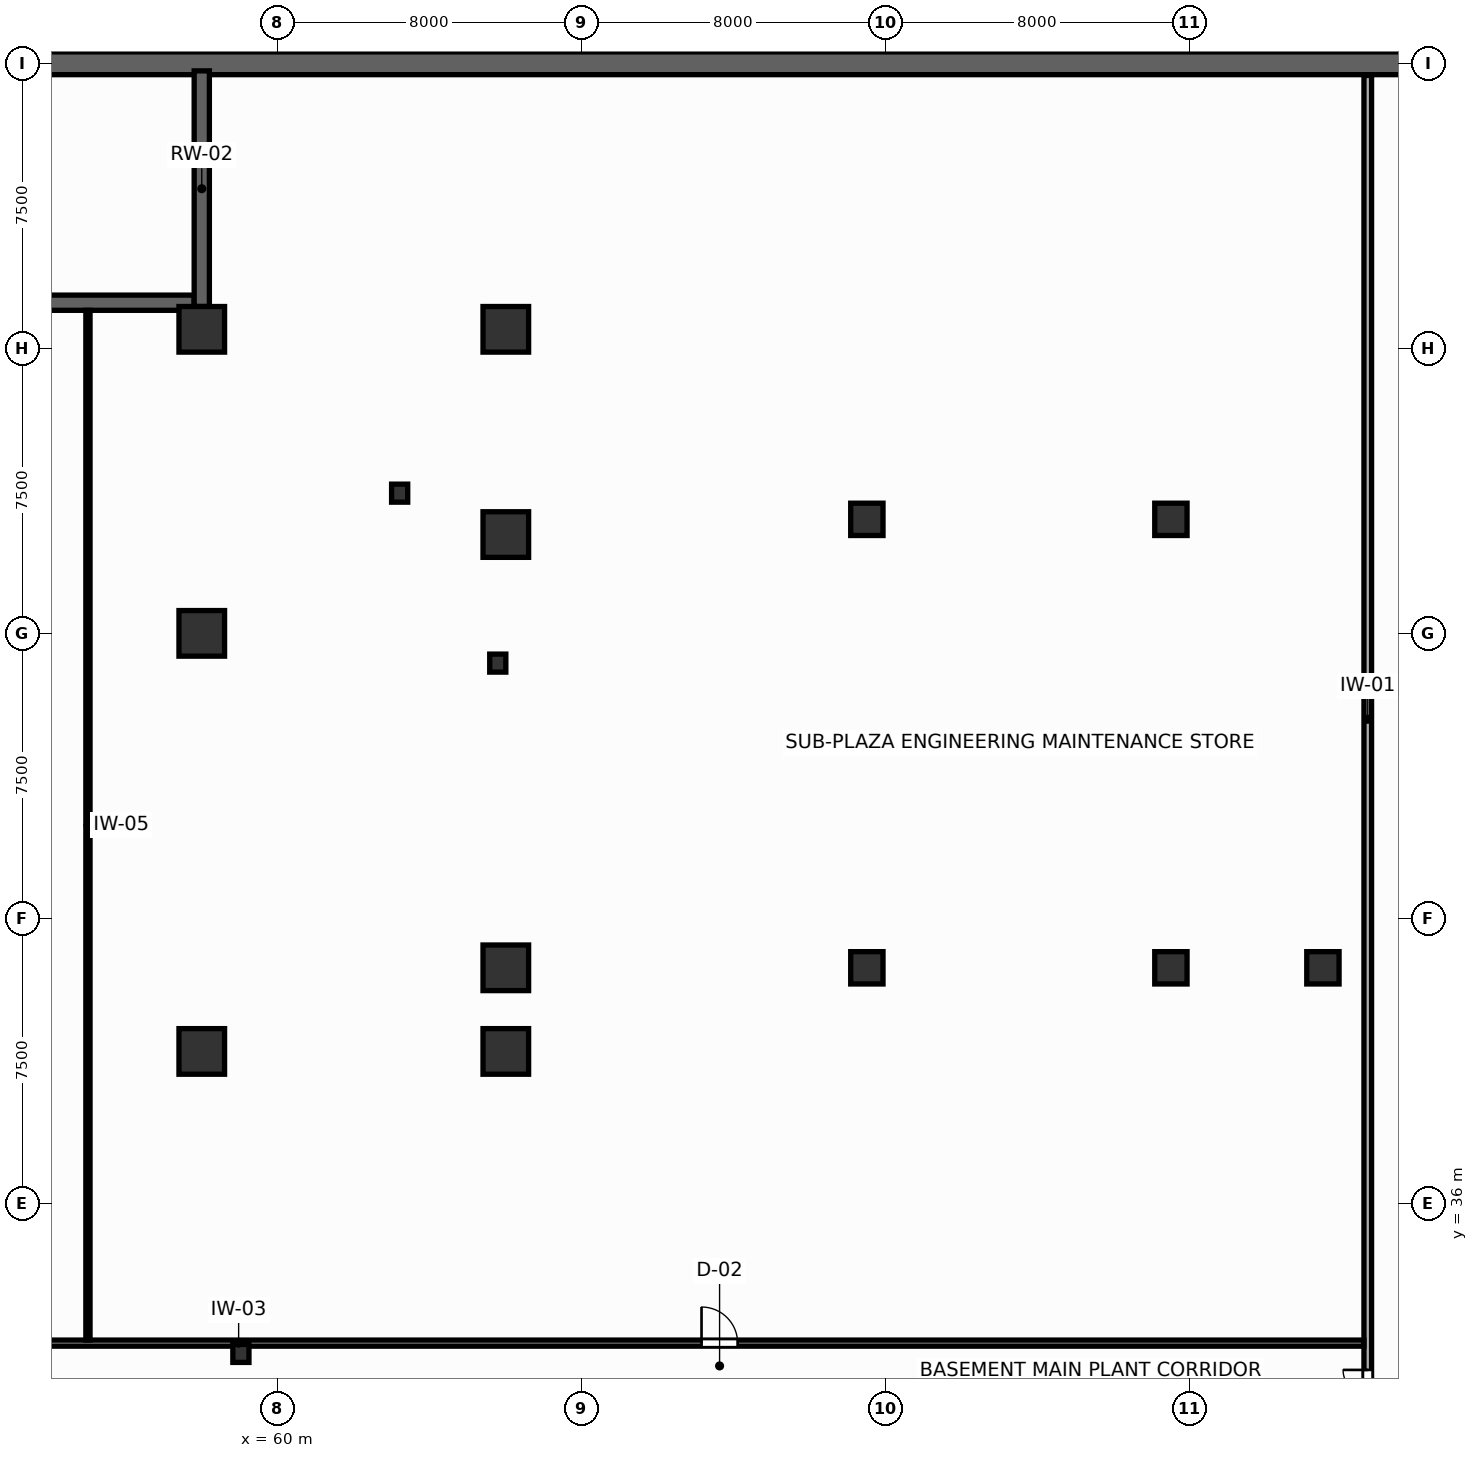
"""IFC4 building model, lengths in metres.
Left out: names, types, materials, properties, quantities, classifications, styles, units other than length and angle.
Written with IfcOpenShell. Run it as: python <this file> out.ifc"""

import sys

from ifc_helpers import new_model, si_unit, direction, frame, frame_2d, origin, origin_2d, place, context, subcontext, project, spatial, rectangle, i_section, extrude, source, transform, mapped, element, fill, save


model = new_model("IFC4")
c1 = context("Model", 3, precision=1e-05, world=origin(), true_north=direction((0.0, 1.0)))
c2 = subcontext(c1, "Body", "Model", "MODEL_VIEW")
j1 = project(units=[si_unit("LENGTHUNIT", "METRE"), si_unit("PLANEANGLEUNIT", "RADIAN")], contexts=[c1])
p1 = place(None, origin())
s1 = spatial("IfcSite", under=j1, at=p1, CompositionType="ELEMENT")
p2 = place(p1, origin())
s2 = spatial("IfcBuilding", under=s1, at=p2, CompositionType="ELEMENT")
p3 = place(p2, frame((0.0, 0.0, -9.0)))
s3 = spatial("IfcBuildingStorey", under=s2, at=p3, CompositionType="ELEMENT", Elevation=-9.0)
p4 = place(p3, frame((1.7, 66.0, 0.0), z_axis=(0.0, 0.0, 1.0), x_axis=(1.0, 0.0, 0.0)))
e1 = element("IfcWall", 1, at=p4, inside=s3, PredefinedType="SOLIDWALL", context=c2, shape_type="SweptSolid", body=[
    extrude(rectangle(XDim=87.98, YDim=0.6, at=frame_2d((43.99, 0.0))), origin(), (0.0, 0.0, 1.0), 4.5),
])
p5 = place(p3, frame((22.2, 59.7, 0.0), z_axis=(0.0, 0.0, 1.0), x_axis=(1.0, 0.0, 0.0)))
e2 = element("IfcWall", 2, at=p5, inside=s3, PredefinedType="SOLIDWALL", context=c2, shape_type="SweptSolid", body=[
    extrude(rectangle(XDim=35.6, YDim=0.4, at=frame_2d((17.8, 0.0))), origin(), (0.0, 0.0, 1.0), 4.18),
])
p6 = place(p3, frame((58.0, 59.6, 0.0), z_axis=(0.0, 0.0, 1.0), x_axis=(0.0, 1.0, 0.0)))
e3 = element("IfcWall", 3, at=p6, inside=s3, PredefinedType="SOLIDWALL", context=c2, shape_type="SweptSolid", body=[
    extrude(rectangle(XDim=6.2, YDim=0.4, at=frame_2d((3.1, 0.0))), origin(), (0.0, 0.0, 1.0), 4.18),
])
m1 = source(origin(), c2, "Body", "SweptSolid", [
    extrude(rectangle(XDim=1.2, YDim=1.2, at=origin_2d()), origin(), (0.0, 0.0, 1.0), 4.5),
])
for number, where, z_axis, x_axis in (
    (4, (66.0, 40.0, 0.0), (0.0, 0.0, 1.0), (1.0, 0.0, 0.0)),
    (5, (66.0, 53.6, 0.0), (0.0, 0.0, 1.0), (1.0, 0.0, 0.0)),
    (6, (66.0, 59.0, 0.0), (0.0, 0.0, 1.0), (1.0, 0.0, 0.0)),
    (7, (58.0, 59.0, 0.0), (0.0, 0.0, 1.0), (1.0, 0.0, 0.0)),
    (8, (58.0, 40.0, 0.0), (0.0, 0.0, 1.0), (1.0, 0.0, 0.0)),
    (9, (58.0, 51.0, 0.0), (0.0, 0.0, 1.0), (1.0, 0.0, 0.0)),
    (10, (66.0, 42.2, 0.0), (0.0, 0.0, 1.0), (1.0, 0.0, 0.0)),
):
    element("IfcColumn", number, at=place(p3, frame(where, z_axis=z_axis, x_axis=x_axis)), inside=s3, PredefinedType="COLUMN", context=c2, shape_type="MappedRepresentation", body=[
        mapped(m1, transform((0.0, 0.0, 0.0), scale=1.0)),
    ])
m2 = source(origin(), c2, "Body", "SweptSolid", [
    extrude(i_section(OverallWidth=0.424, OverallDepth=0.474, WebThickness=0.045, FlangeThickness=0.072, FilletRadius=0.015, at=origin_2d()), origin(), (0.0, 0.0, 1.0), 4.5),
])
for number, where, z_axis, x_axis in (
    (11, (65.789, 50.217, 0.0), (0.0, 0.0, 1.0), (1.0, 0.0, 0.0)),
    (12, (63.207, 54.689, 0.0), (0.0, 0.0, 1.0), (1.0, 0.0, 0.0)),
    (13, (59.03, 32.054, 0.0), (0.0, 0.0, 1.0), (1.0, 0.0, 0.0)),
):
    element("IfcColumn", number, at=place(p3, frame(where, z_axis=z_axis, x_axis=x_axis)), inside=s3, PredefinedType="COLUMN", context=c2, shape_type="MappedRepresentation", body=[
        mapped(m2, transform((0.0, 0.0, 0.0), scale=1.0)),
    ])
m3 = source(origin(), c2, "Body", "SweptSolid", [
    extrude(rectangle(XDim=0.85, YDim=0.85, at=origin_2d()), origin(), (0.0, 0.0, 1.0), 4.5),
])
for number, where, z_axis, x_axis in (
    (14, (75.5, 42.2, 0.0), (0.0, 0.0, 1.0), (1.0, 0.0, 0.0)),
    (15, (83.5, 42.2, 0.0), (0.0, 0.0, 1.0), (1.0, 0.0, 0.0)),
    (16, (87.5, 42.2, 0.0), (0.0, 0.0, 1.0), (1.0, 0.0, 0.0)),
    (17, (75.5, 54.0, 0.0), (0.0, 0.0, 1.0), (1.0, 0.0, 0.0)),
    (18, (83.5, 54.0, 0.0), (0.0, 0.0, 1.0), (1.0, 0.0, 0.0)),
):
    element("IfcColumn", number, at=place(p3, frame(where, z_axis=z_axis, x_axis=x_axis)), inside=s3, PredefinedType="COLUMN", context=c2, shape_type="MappedRepresentation", body=[
        mapped(m3, transform((0.0, 0.0, 0.0), scale=1.0)),
    ])
p7 = place(p3, frame((88.68, 0.82, 0.0), z_axis=(0.0, 0.0, 1.0), x_axis=(0.0, 1.0, 0.0)))
e19 = element("IfcWall", 19, at=p7, inside=s3, PredefinedType="PARTITIONING", context=c2, shape_type="SweptSolid", body=[
    extrude(rectangle(XDim=64.86, YDim=0.2, at=frame_2d((32.43, 0.0))), origin(), (0.0, 0.0, 1.0), 4.18),
])
p8 = place(p7, frame((29.5, 0.0, 0.0)))
e20 = element("IfcOpeningElement", 20, at=p8, cuts=e19, PredefinedType="OPENING", context=c2, shape_type="SweptSolid", body=[
    extrude(rectangle(XDim=1.3, YDim=2.1, at=frame_2d((0.65, 1.05))), frame((0.0, 0.11, 0.0), z_axis=(0.0, -1.0, 0.0), x_axis=(1.0, 0.0, 0.0)), (0.0, 0.0, 1.0), 0.22),
])
p9 = place(p3, frame((46.97, 32.325, 0.0), z_axis=(0.0, 0.0, 1.0), x_axis=(1.0, 0.0, 0.0)))
e21 = element("IfcWall", 21, at=p9, inside=s3, PredefinedType="PARTITIONING", context=c2, shape_type="SweptSolid", body=[
    extrude(rectangle(XDim=41.608, YDim=0.16, at=frame_2d((20.804, 0.0))), origin(), (0.0, 0.0, 1.0), 3.48),
])
p10 = place(p9, frame((24.18, 0.0, 0.0)))
e22 = element("IfcOpeningElement", 22, at=p10, cuts=e21, PredefinedType="OPENING", context=c2, shape_type="SweptSolid", body=[
    extrude(rectangle(XDim=0.95, YDim=2.05, at=frame_2d((0.475, 1.025))), frame((0.0, 0.09, 0.0), z_axis=(0.0, -1.0, 0.0), x_axis=(1.0, 0.0, 0.0)), (0.0, 0.0, 1.0), 0.18),
])
p11 = place(p3, frame((55.005, 32.407, 0.0), z_axis=(0.0, 0.0, 1.0), x_axis=(0.0, 1.0, 0.0)))
e23 = element("IfcWall", 23, at=p11, inside=s3, PredefinedType="MOVABLE", context=c2, shape_type="SweptSolid", body=[
    extrude(rectangle(XDim=27.091, YDim=0.11, at=frame_2d((13.545, 0.0))), origin(), (0.0, 0.0, 1.0), 4.18),
])
p12 = place(p8, origin())
e24 = element("IfcDoor", 24, at=p12, inside=s3, OperationType="DOUBLE_DOOR_SINGLE_SWING", PredefinedType="DOOR", context=c2, shape_type="SweptSolid", body=[
    extrude(rectangle(XDim=1.3, YDim=2.1, at=frame_2d((0.65, 1.05))), frame((0.0, 0.025, 0.0), z_axis=(0.0, -1.0, 0.0), x_axis=(1.0, 0.0, 0.0)), (0.0, 0.0, 1.0), 0.05),
])
fill(e20, e24)
p13 = place(p10, origin())
e25 = element("IfcDoor", 25, at=p13, inside=s3, OperationType="SINGLE_SWING_LEFT", PredefinedType="DOOR", context=c2, shape_type="SweptSolid", body=[
    extrude(rectangle(XDim=0.95, YDim=2.05, at=frame_2d((0.475, 1.025))), frame((0.0, 0.025, 0.0), z_axis=(0.0, -1.0, 0.0), x_axis=(1.0, 0.0, 0.0)), (0.0, 0.0, 1.0), 0.05),
])
fill(e22, e25)
save(model, sys.argv[1])
